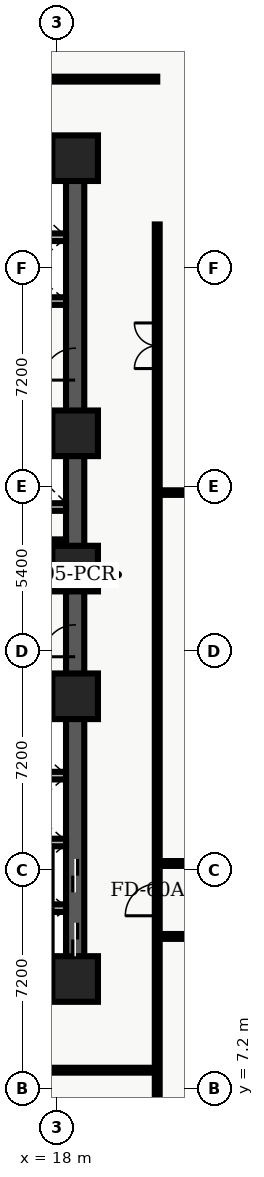
"""IFC4 building model, lengths in metres.
Left out: names, types, materials, properties, quantities, classifications, styles, units other than length and angle.
Written with IfcOpenShell. Run it as: python <this file> out.ifc"""

import sys

from ifc_helpers import new_model, entity, si_unit, converted_unit, direction, frame, origin_with_axes, origin_2d_with_axis, place, context, subcontext, project, spatial, polyline, rectangle, outline, extrude, element, fill, save


model = new_model("IFC4")
c1 = context("Model", 3, precision=1e-05, world=origin_with_axes(), true_north=direction((0.0, 1.0)))
c2 = subcontext(c1, "Body", "Model", "MODEL_VIEW")
j1 = project(units=[si_unit("LENGTHUNIT", "METRE"), converted_unit("PLANEANGLEUNIT", "DEGREE", entity("IfcPlaneAngleMeasure", 0.017), si_unit("PLANEANGLEUNIT", "RADIAN"), dimensions=[0, 0, 0, 0, 0, 0, 0])], contexts=[c1])
p1 = place(None, origin_with_axes())
s1 = spatial("IfcSite", under=j1, at=p1, CompositionType="ELEMENT")
p2 = place(p1, origin_with_axes())
s2 = spatial("IfcBuilding", under=s1, at=p2, CompositionType="ELEMENT")
p3 = place(p2, frame((0.0, 0.0, 24.3), z_axis=(0.0, 0.0, 1.0), x_axis=(1.0, 0.0, 0.0)))
s3 = spatial("IfcBuildingStorey", under=s2, at=p3, CompositionType="ELEMENT", Elevation=24.3)
p4 = place(p3, frame((11.4, 10.8, 0.0), z_axis=(0.0, 0.0, 1.0), x_axis=(1.0, 0.0, 0.0)))
e1 = element("IfcWall", 1, at=p4, inside=s3, PredefinedType="SHEAR", context=c2, shape_type="SweptSolid", body=[
    extrude(outline(polyline([(0.0, -0.3), (7.2, -0.3), (7.2, 0.3), (0.0, 0.3), (0.0, -0.3)])), origin_with_axes(), (0.0, 0.0, 1.0), 4.2),
])
p5 = place(p4, frame((2.625, 0.0, 0.0), z_axis=(0.0, 0.0, 1.0), x_axis=(1.0, 0.0, 0.0)))
e2 = element("IfcOpeningElement", 2, at=p5, cuts=e1, PredefinedType="OPENING", context=c2, shape_type="SweptSolid", body=[
    extrude(rectangle(XDim=1.05, YDim=0.62, at=origin_2d_with_axis()), origin_with_axes(), (0.0, 0.0, 1.0), 2.15),
])
p6 = place(p3, frame((11.4, 37.8, 0.0), z_axis=(0.0, 0.0, 1.0), x_axis=(1.0, 0.0, 0.0)))
e3 = element("IfcWall", 3, at=p6, inside=s3, PredefinedType="SHEAR", context=c2, shape_type="SweptSolid", body=[
    extrude(outline(polyline([(0.0, -0.3), (7.2, -0.3), (7.2, 0.3), (0.0, 0.3), (0.0, -0.3)])), origin_with_axes(), (0.0, 0.0, 1.0), 4.2),
])
p7 = place(p6, frame((2.625, 0.0, 0.0), z_axis=(0.0, 0.0, 1.0), x_axis=(1.0, 0.0, 0.0)))
e4 = element("IfcOpeningElement", 4, at=p7, cuts=e3, PredefinedType="OPENING", context=c2, shape_type="SweptSolid", body=[
    extrude(rectangle(XDim=1.05, YDim=0.62, at=origin_2d_with_axis()), origin_with_axes(), (0.0, 0.0, 1.0), 2.15),
])
p8 = place(p3, frame((18.6, 10.8, 0.0), z_axis=(0.0, 0.0, 1.0), x_axis=(0.0, 1.0, 0.0)))
e5 = element("IfcWall", 5, at=p8, inside=s3, PredefinedType="SHEAR", context=c2, shape_type="SweptSolid", body=[
    extrude(outline(polyline([(0.0, -0.3), (13.5, -0.3), (13.5, 0.3), (0.0, 0.3), (0.0, -0.3)])), origin_with_axes(), (0.0, 0.0, 1.0), 4.2),
])
p9 = place(p8, frame((1.3, 0.0, 0.0), z_axis=(0.0, 0.0, 1.0), x_axis=(1.0, 0.0, 0.0)))
e6 = element("IfcOpeningElement", 6, at=p9, cuts=e5, PredefinedType="OPENING", context=c2, shape_type="SweptSolid", body=[
    extrude(rectangle(XDim=1.1, YDim=0.62, at=origin_2d_with_axis()), origin_with_axes(), (0.0, 0.0, 1.0), 2.15),
])
p10 = place(p8, frame((3.4, 0.0, 0.0), z_axis=(0.0, 0.0, 1.0), x_axis=(1.0, 0.0, 0.0)))
e7 = element("IfcOpeningElement", 7, at=p10, cuts=e5, PredefinedType="OPENING", context=c2, shape_type="SweptSolid", body=[
    extrude(rectangle(XDim=1.1, YDim=0.62, at=origin_2d_with_axis()), origin_with_axes(), (0.0, 0.0, 1.0), 2.15),
])
p11 = place(p8, frame((11.125, 0.0, 0.0), z_axis=(0.0, 0.0, 1.0), x_axis=(1.0, 0.0, 0.0)))
e8 = element("IfcOpeningElement", 8, at=p11, cuts=e5, PredefinedType="OPENING", context=c2, shape_type="SweptSolid", body=[
    extrude(rectangle(XDim=1.05, YDim=0.62, at=origin_2d_with_axis()), origin_with_axes(), (0.0, 0.0, 1.0), 2.15),
])
p12 = place(p3, frame((18.6, 24.3, 0.0), z_axis=(0.0, 0.0, 1.0), x_axis=(0.0, 1.0, 0.0)))
e9 = element("IfcWall", 9, at=p12, inside=s3, PredefinedType="SHEAR", context=c2, shape_type="SweptSolid", body=[
    extrude(outline(polyline([(0.0, -0.3), (13.5, -0.3), (13.5, 0.3), (0.0, 0.3), (0.0, -0.3)])), origin_with_axes(), (0.0, 0.0, 1.0), 4.2),
])
p13 = place(p12, frame((6.725, 0.0, 0.0), z_axis=(0.0, 0.0, 1.0), x_axis=(1.0, 0.0, 0.0)))
e10 = element("IfcOpeningElement", 10, at=p13, cuts=e9, PredefinedType="OPENING", context=c2, shape_type="SweptSolid", body=[
    extrude(rectangle(XDim=1.05, YDim=0.62, at=origin_2d_with_axis()), origin_with_axes(), (0.0, 0.0, 1.0), 2.15),
])
for number, where, z_axis, x_axis in (
    (11, (11.7, 19.825, 0.0), (0.0, 0.0, 1.0), (1.0, 0.0, 0.0)),
    (12, (11.7, 28.775, 0.0), (0.0, 0.0, 1.0), (1.0, 0.0, 0.0)),
):
    element("IfcWall", number, at=place(p3, frame(where, z_axis=z_axis, x_axis=x_axis)), inside=s3, PredefinedType="SHEAR", context=c2, shape_type="SweptSolid", body=[
        extrude(outline(polyline([(0.0, -0.125), (6.6, -0.125), (6.6, 0.125), (0.0, 0.125), (0.0, -0.125)])), origin_with_axes(), (0.0, 0.0, 1.0), 4.2),
    ])
p14 = place(p3, frame((11.7, 24.1, 0.0), z_axis=(0.0, 0.0, 1.0), x_axis=(1.0, 0.0, 0.0)))
e13 = element("IfcWall", 13, at=p14, inside=s3, PredefinedType="SOLIDWALL", context=c2, shape_type="SweptSolid", body=[
    extrude(outline(polyline([(0.0, -0.125), (6.6, -0.125), (6.6, 0.125), (0.0, 0.125), (0.0, -0.125)])), origin_with_axes(), (0.0, 0.0, 1.0), 3.24),
])
p15 = place(p14, frame((3.75, 0.0, 0.0), z_axis=(0.0, 0.0, 1.0), x_axis=(1.0, 0.0, 0.0)))
e14 = element("IfcOpeningElement", 14, at=p15, cuts=e13, PredefinedType="OPENING", context=c2, shape_type="SweptSolid", body=[
    extrude(rectangle(XDim=0.9, YDim=0.27, at=origin_2d_with_axis()), origin_with_axes(), (0.0, 0.0, 1.0), 2.15),
])
p16 = place(p3, frame((11.7, 26.325, 0.0), z_axis=(0.0, 0.0, 1.0), x_axis=(1.0, 0.0, 0.0)))
e15 = element("IfcWall", 15, at=p16, inside=s3, PredefinedType="SOLIDWALL", context=c2, shape_type="SweptSolid", body=[
    extrude(outline(polyline([(0.0, -0.125), (6.6, -0.125), (6.6, 0.125), (0.0, 0.125), (0.0, -0.125)])), origin_with_axes(), (0.0, 0.0, 1.0), 3.24),
])
p17 = place(p16, frame((3.5, 0.0, 0.0), z_axis=(0.0, 0.0, 1.0), x_axis=(1.0, 0.0, 0.0)))
e16 = element("IfcOpeningElement", 16, at=p17, cuts=e15, PredefinedType="OPENING", context=c2, shape_type="SweptSolid", body=[
    extrude(rectangle(XDim=0.9, YDim=0.27, at=origin_2d_with_axis()), origin_with_axes(), (0.0, 0.0, 1.0), 2.15),
])
for number, where, z_axis, x_axis in (
    (17, (18.6, 10.8, 0.0), (0.0, 0.0, 1.0), (1.0, 0.0, 0.0)),
    (18, (18.6, 20.1, 0.0), (0.0, 0.0, 1.0), (1.0, 0.0, 0.0)),
    (19, (18.6, 24.3, 0.0), (0.0, 0.0, 1.0), (1.0, 0.0, 0.0)),
    (20, (18.6, 28.75, 0.0), (0.0, 0.0, 1.0), (1.0, 0.0, 0.0)),
    (21, (18.6, 37.8, 0.0), (0.0, 0.0, 1.0), (1.0, 0.0, 0.0)),
):
    element("IfcColumn", number, at=place(p3, frame(where, z_axis=z_axis, x_axis=x_axis)), inside=s3, PredefinedType="COLUMN", context=c2, shape_type="SweptSolid", body=[
        extrude(rectangle(XDim=1.5, YDim=1.5, at=origin_2d_with_axis()), origin_with_axes(), (0.0, 0.0, 1.0), 4.5),
    ])
p18 = place(p3, frame((14.62, 25.18, 0.0), z_axis=(0.0, 0.0, 1.0), x_axis=(1.0, 0.0, 0.0)))
e22 = element("IfcWall", 22, at=p18, inside=s3, PredefinedType="PARTITIONING", context=c2, shape_type="SweptSolid", body=[
    extrude(outline(polyline([(0.0, -0.08), (3.68, -0.08), (3.68, 0.08), (0.0, 0.08), (0.0, -0.08)])), origin_with_axes(), (0.0, 0.0, 1.0), 3.2),
])
p19 = place(p18, frame((1.95, 0.0, 0.0), z_axis=(0.0, 0.0, 1.0), x_axis=(1.0, 0.0, 0.0)))
e23 = element("IfcOpeningElement", 23, at=p19, cuts=e22, PredefinedType="OPENING", context=c2, shape_type="SweptSolid", body=[
    extrude(rectangle(XDim=0.9, YDim=0.18, at=origin_2d_with_axis()), origin_with_axes(), (0.0, 0.0, 1.0), 2.15),
])
for number, where, z_axis, x_axis in (
    (24, (15.84, 13.13, 0.0), (0.0, 0.0, 1.0), (1.0, 0.0, 0.0)),
    (25, (15.84, 15.29, 0.0), (0.0, 0.0, 1.0), (1.0, 0.0, 0.0)),
    (26, (15.84, 17.49, 0.0), (0.0, 0.0, 1.0), (1.0, 0.0, 0.0)),
    (27, (15.84, 33.1, 0.0), (0.0, 0.0, 1.0), (1.0, 0.0, 0.0)),
    (28, (15.84, 35.2, 0.0), (0.0, 0.0, 1.0), (1.0, 0.0, 0.0)),
):
    element("IfcWall", number, at=place(p3, frame(where, z_axis=z_axis, x_axis=x_axis)), inside=s3, PredefinedType="SOLIDWALL", context=c2, shape_type="SweptSolid", body=[
        extrude(outline(polyline([(0.0, -0.125), (2.46, -0.125), (2.46, 0.125), (0.0, 0.125), (0.0, -0.125)])), origin_with_axes(), (0.0, 0.0, 1.0), 3.2),
    ])
p20 = place(p3, frame((0.38, 7.8, 0.0), z_axis=(0.0, 0.0, 1.0), x_axis=(1.0, 0.0, 0.0)))
e29 = element("IfcWall", 29, at=p20, inside=s3, PredefinedType="PARTITIONING", context=c2, shape_type="SweptSolid", body=[
    extrude(outline(polyline([(0.0, -0.08), (20.92, -0.08), (20.92, 0.08), (0.0, 0.08), (0.0, -0.08)])), origin_with_axes(), (0.0, 0.0, 1.0), 3.2),
])
p21 = place(p20, frame((3.7, 0.0, 0.0), z_axis=(0.0, 0.0, 1.0), x_axis=(1.0, 0.0, 0.0)))
e30 = element("IfcOpeningElement", 30, at=p21, cuts=e29, PredefinedType="OPENING", context=c2, shape_type="SweptSolid", body=[
    extrude(rectangle(XDim=1.0, YDim=0.18, at=origin_2d_with_axis()), origin_with_axes(), (0.0, 0.0, 1.0), 2.15),
])
p22 = place(p20, frame((15.3, 0.0, 0.0), z_axis=(0.0, 0.0, 1.0), x_axis=(1.0, 0.0, 0.0)))
e31 = element("IfcOpeningElement", 31, at=p22, cuts=e29, PredefinedType="OPENING", context=c2, shape_type="SweptSolid", body=[
    extrude(rectangle(XDim=1.0, YDim=0.18, at=origin_2d_with_axis()), origin_with_axes(), (0.0, 0.0, 1.0), 2.15),
])
p23 = place(p3, frame((0.38, 40.4, 0.0), z_axis=(0.0, 0.0, 1.0), x_axis=(1.0, 0.0, 0.0)))
e32 = element("IfcWall", 32, at=p23, inside=s3, PredefinedType="PARTITIONING", context=c2, shape_type="SweptSolid", body=[
    extrude(outline(polyline([(0.0, -0.08), (20.92, -0.08), (20.92, 0.08), (0.0, 0.08), (0.0, -0.08)])), origin_with_axes(), (0.0, 0.0, 1.0), 3.2),
])
p24 = place(p23, frame((15.25, 0.0, 0.0), z_axis=(0.0, 0.0, 1.0), x_axis=(1.0, 0.0, 0.0)))
e33 = element("IfcOpeningElement", 33, at=p24, cuts=e32, PredefinedType="OPENING", context=c2, shape_type="SweptSolid", body=[
    extrude(rectangle(XDim=1.5, YDim=0.18, at=origin_2d_with_axis()), origin_with_axes(), (0.0, 0.0, 1.0), 2.2),
])
p25 = place(p3, frame((21.3, 0.38, 0.0), z_axis=(0.0, 0.0, 1.0), x_axis=(0.0, 1.0, 0.0)))
e34 = element("IfcWall", 34, at=p25, inside=s3, PredefinedType="PARTITIONING", context=c2, shape_type="SweptSolid", body=[
    extrude(outline(polyline([(0.0, -0.08), (35.24, -0.08), (35.24, 0.08), (0.0, 0.08), (0.0, -0.08)])), origin_with_axes(), (0.0, 0.0, 1.0), 3.2),
])
p26 = place(p25, frame((13.025, 0.0, 0.0), z_axis=(0.0, 0.0, 1.0), x_axis=(1.0, 0.0, 0.0)))
e35 = element("IfcOpeningElement", 35, at=p26, cuts=e34, PredefinedType="OPENING", context=c2, shape_type="SweptSolid", body=[
    extrude(rectangle(XDim=1.05, YDim=0.18, at=origin_2d_with_axis()), origin_with_axes(), (0.0, 0.0, 1.0), 2.15),
])
p27 = place(p25, frame((31.25, 0.0, 0.0), z_axis=(0.0, 0.0, 1.0), x_axis=(1.0, 0.0, 0.0)))
e36 = element("IfcOpeningElement", 36, at=p27, cuts=e34, PredefinedType="OPENING", context=c2, shape_type="SweptSolid", body=[
    extrude(rectangle(XDim=1.5, YDim=0.18, at=origin_2d_with_axis()), origin_with_axes(), (0.0, 0.0, 1.0), 2.2),
])
p28 = place(p3, frame((21.3, 12.2, 0.0), z_axis=(0.0, 0.0, 1.0), x_axis=(1.0, 0.0, 0.0)))
e37 = element("IfcWall", 37, at=p28, inside=s3, PredefinedType="PARTITIONING", context=c2, shape_type="SweptSolid", body=[
    extrude(outline(polyline([(0.0, -0.08), (14.95, -0.08), (14.95, 0.08), (0.0, 0.08), (0.0, -0.08)])), origin_with_axes(), (0.0, 0.0, 1.0), 3.2),
])
p29 = place(p28, frame((8.25, 0.0, 0.0), z_axis=(0.0, 0.0, 1.0), x_axis=(1.0, 0.0, 0.0)))
e38 = element("IfcOpeningElement", 38, at=p29, cuts=e37, PredefinedType="OPENING", context=c2, shape_type="SweptSolid", body=[
    extrude(rectangle(XDim=1.5, YDim=0.18, at=origin_2d_with_axis()), origin_with_axes(), (0.0, 0.0, 1.0), 2.2),
])
p30 = place(p3, frame((21.3, 14.6, 0.0), z_axis=(0.0, 0.0, 1.0), x_axis=(1.0, 0.0, 0.0)))
e39 = element("IfcWall", 39, at=p30, inside=s3, PredefinedType="PARTITIONING", context=c2, shape_type="SweptSolid", body=[
    extrude(outline(polyline([(0.0, -0.08), (14.95, -0.08), (14.95, 0.08), (0.0, 0.08), (0.0, -0.08)])), origin_with_axes(), (0.0, 0.0, 1.0), 3.2),
])
p31 = place(p30, frame((8.25, 0.0, 0.0), z_axis=(0.0, 0.0, 1.0), x_axis=(1.0, 0.0, 0.0)))
e40 = element("IfcOpeningElement", 40, at=p31, cuts=e39, PredefinedType="OPENING", context=c2, shape_type="SweptSolid", body=[
    extrude(rectangle(XDim=1.5, YDim=0.18, at=origin_2d_with_axis()), origin_with_axes(), (0.0, 0.0, 1.0), 2.2),
])
p32 = place(p3, frame((21.3, 26.8, 0.0), z_axis=(0.0, 0.0, 1.0), x_axis=(1.0, 0.0, 0.0)))
e41 = element("IfcWall", 41, at=p32, inside=s3, PredefinedType="PARTITIONING", context=c2, shape_type="SweptSolid", body=[
    extrude(outline(polyline([(0.0, -0.075), (29.25, -0.075), (29.25, 0.075), (0.0, 0.075), (0.0, -0.075)])), origin_with_axes(), (0.0, 0.0, 1.0), 3.2),
])
p33 = place(p8, frame((1.3, 0.0, 0.0), z_axis=(0.0, 0.0, 1.0), x_axis=(1.0, 0.0, 0.0)))
e42 = element("IfcDoor", 42, at=p33, inside=s3, OperationType="SLIDING_TO_LEFT", PredefinedType="DOOR", context=c2, shape_type="SweptSolid", body=[
    extrude(rectangle(XDim=1.1, YDim=0.09, at=origin_2d_with_axis()), origin_with_axes(), (0.0, 0.0, 1.0), 2.15),
])
fill(e6, e42)
p34 = place(p8, frame((3.4, 0.0, 0.0), z_axis=(0.0, 0.0, 1.0), x_axis=(1.0, 0.0, 0.0)))
e43 = element("IfcDoor", 43, at=p34, inside=s3, OperationType="SLIDING_TO_RIGHT", PredefinedType="DOOR", context=c2, shape_type="SweptSolid", body=[
    extrude(rectangle(XDim=1.1, YDim=0.09, at=origin_2d_with_axis()), origin_with_axes(), (0.0, 0.0, 1.0), 2.15),
])
fill(e7, e43)
p35 = place(p8, frame((11.125, 0.0, 0.0), z_axis=(0.0, 0.0, 1.0), x_axis=(1.0, 0.0, 0.0)))
e44 = element("IfcDoor", 44, at=p35, inside=s3, OperationType="SINGLE_SWING_LEFT", PredefinedType="DOOR", context=c2, shape_type="SweptSolid", body=[
    extrude(rectangle(XDim=1.05, YDim=0.09, at=origin_2d_with_axis()), origin_with_axes(), (0.0, 0.0, 1.0), 2.15),
])
fill(e8, e44)
p36 = place(p12, frame((6.725, 0.0, 0.0), z_axis=(0.0, 0.0, 1.0), x_axis=(1.0, 0.0, 0.0)))
e45 = element("IfcDoor", 45, at=p36, inside=s3, OperationType="SINGLE_SWING_LEFT", PredefinedType="DOOR", context=c2, shape_type="SweptSolid", body=[
    extrude(rectangle(XDim=1.05, YDim=0.09, at=origin_2d_with_axis()), origin_with_axes(), (0.0, 0.0, 1.0), 2.15),
])
fill(e10, e45)
p37 = place(p25, frame((13.025, 0.0, 0.0), z_axis=(0.0, 0.0, 1.0), x_axis=(1.0, 0.0, 0.0)))
e46 = element("IfcDoor", 46, at=p37, inside=s3, OperationType="SINGLE_SWING_LEFT", PredefinedType="DOOR", context=c2, shape_type="SweptSolid", body=[
    extrude(rectangle(XDim=1.05, YDim=0.09, at=origin_2d_with_axis()), origin_with_axes(), (0.0, 0.0, 1.0), 2.15),
])
fill(e35, e46)
p38 = place(p25, frame((31.25, 0.0, 0.0), z_axis=(0.0, 0.0, 1.0), x_axis=(1.0, 0.0, 0.0)))
e47 = element("IfcDoor", 47, at=p38, inside=s3, OperationType="DOUBLE_DOOR_SINGLE_SWING", PredefinedType="DOOR", context=c2, shape_type="SweptSolid", body=[
    extrude(rectangle(XDim=1.5, YDim=0.09, at=origin_2d_with_axis()), origin_with_axes(), (0.0, 0.0, 1.0), 2.2),
])
fill(e36, e47)
save(model, sys.argv[1])
